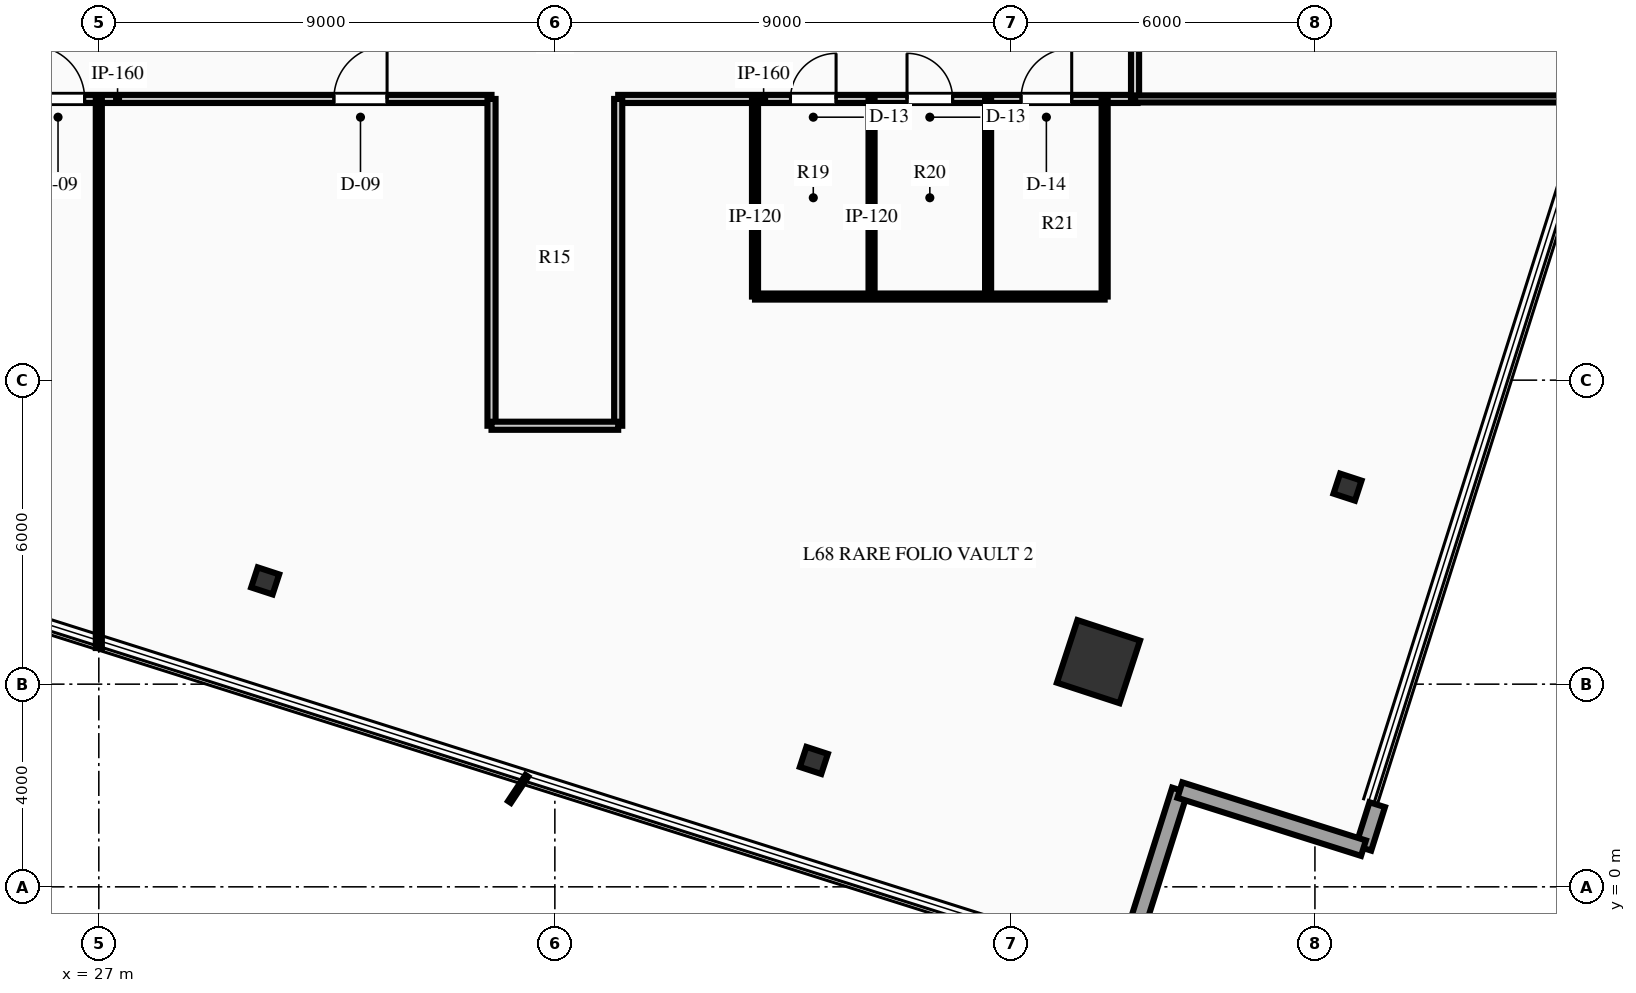
"""IFC4 building model, lengths in metres.
Left out: names, types, materials, properties, quantities, classifications, styles, units other than length and angle.
Written with IfcOpenShell. Run it as: python <this file> out.ifc"""

import sys

from ifc_helpers import new_model, si_unit, direction, frame, frame_2d, origin, origin_2d, place, context, subcontext, project, spatial, rectangle, hollow_rectangle, i_section, extrude, element, fill, save


model = new_model("IFC4")
c1 = context("Model", 3, precision=1e-05, world=origin(), true_north=direction((0.0, 1.0)))
c2 = subcontext(c1, "Body", "Model", "MODEL_VIEW")
j1 = project(units=[si_unit("LENGTHUNIT", "METRE"), si_unit("PLANEANGLEUNIT", "RADIAN")], contexts=[c1])
p1 = place(None, origin())
s1 = spatial("IfcSite", under=j1, at=p1, CompositionType="ELEMENT")
p2 = place(p1, origin())
s2 = spatial("IfcBuilding", under=s1, at=p2, CompositionType="ELEMENT")
p3 = place(p2, frame((0.0, 0.0, 271.2)))
s3 = spatial("IfcBuildingStorey", under=s2, at=p3, CompositionType="ELEMENT", Elevation=271.2)
p4 = place(p3, frame((46.728, 4.445, 0.0), z_axis=(0.0, 0.0, 1.0), x_axis=(0.311008203279, 0.950407227189, 0.0)))
e1 = element("IfcColumn", 1, at=p4, inside=s3, PredefinedType="COLUMN", context=c2, shape_type="SweptSolid", body=[
    extrude(hollow_rectangle(XDim=1.3, YDim=1.3, WallThickness=0.06, at=origin_2d()), origin(), (0.0, 0.0, 1.0), 3.75),
])
for number, where, z_axis, x_axis in (
    (2, (51.643, 7.889, 0.0), (0.0, 0.0, 1.0), (0.311, 0.95, 0.0)),
    (3, (30.283, 6.038, 0.0), (0.0, 0.0, 1.0), (0.311, 0.95, 0.0)),
    (4, (41.111, 2.495, 0.0), (0.0, 0.0, 1.0), (0.311, 0.95, 0.0)),
):
    element("IfcColumn", number, at=place(p3, frame(where, z_axis=z_axis, x_axis=x_axis)), inside=s3, PredefinedType="COLUMN", context=c2, shape_type="SweptSolid", body=[
        extrude(i_section(OverallWidth=0.416, OverallDepth=0.445, WebThickness=0.039, FlangeThickness=0.063, at=origin_2d()), origin(), (0.0, 0.0, 1.0), 3.75),
    ])
p5 = place(p3, frame((52.229, 1.622, 0.0), z_axis=(0.0, 0.0, 1.0), x_axis=(-0.301624624899, -0.95342675946, 0.0)))
e5 = element("IfcWall", 5, at=p5, inside=s3, PredefinedType="STANDARD", context=c2, shape_type="SweptSolid", body=[
    extrude(rectangle(XDim=0.9, YDim=0.32, at=frame_2d((0.45, 0.0))), origin(), (0.0, 0.0, 1.0), 3.48),
])
p6 = place(p3, frame((48.335, 1.909, 0.0), z_axis=(0.0, 0.0, 1.0), x_axis=(-0.301580261621, -0.953440793023, 0.0)))
e6 = element("IfcWall", 6, at=p6, inside=s3, PredefinedType="STANDARD", context=c2, shape_type="SweptSolid", body=[
    extrude(rectangle(XDim=3.8, YDim=0.32, at=frame_2d((1.9, 0.0))), origin(), (0.0, 0.0, 1.0), 3.48),
])
p7 = place(p3, frame((51.958, 0.763, 0.0), z_axis=(0.0, 0.0, 1.0), x_axis=(-0.953459265402, 0.301521855292, 0.0)))
e7 = element("IfcWall", 7, at=p7, inside=s3, PredefinedType="STANDARD", context=c2, shape_type="SweptSolid", body=[
    extrude(rectangle(XDim=3.8, YDim=0.32, at=frame_2d((1.9, 0.0))), origin(), (0.0, 0.0, 1.0), 3.48),
])
p8 = place(p3, frame((24.5, 15.55, 0.0), z_axis=(0.0, 0.0, 1.0), x_axis=(1.0, 0.0, 0.0)))
e8 = element("IfcWall", 8, at=p8, inside=s3, PredefinedType="PARTITIONING", context=c2, shape_type="SweptSolid", body=[
    extrude(rectangle(XDim=10.25, YDim=0.16, at=frame_2d((5.125, 0.0))), origin(), (0.0, 0.0, 1.0), 3.48),
])
p9 = place(p8, frame((1.17, 0.0, 0.0)))
e9 = element("IfcOpeningElement", 9, at=p9, cuts=e8, PredefinedType="OPENING", context=c2, shape_type="SweptSolid", body=[
    extrude(rectangle(XDim=1.05, YDim=2.15, at=frame_2d((0.525, 1.075))), frame((0.0, 0.09, 0.0), z_axis=(0.0, -1.0, 0.0), x_axis=(1.0, 0.0, 0.0)), (0.0, 0.0, 1.0), 0.18),
])
p10 = place(p8, frame((7.139, 0.0, 0.0)))
e10 = element("IfcOpeningElement", 10, at=p10, cuts=e8, PredefinedType="OPENING", context=c2, shape_type="SweptSolid", body=[
    extrude(rectangle(XDim=1.05, YDim=2.15, at=frame_2d((0.525, 1.075))), frame((0.0, 0.09, 0.0), z_axis=(0.0, -1.0, 0.0), x_axis=(1.0, 0.0, 0.0)), (0.0, 0.0, 1.0), 0.18),
])
p11 = place(p3, frame((37.25, 15.55, 0.0), z_axis=(0.0, 0.0, 1.0), x_axis=(1.0, 0.0, 0.0)))
e11 = element("IfcWall", 11, at=p11, inside=s3, PredefinedType="PARTITIONING", context=c2, shape_type="SweptSolid", body=[
    extrude(rectangle(XDim=10.25, YDim=0.16, at=frame_2d((5.125, 0.0))), origin(), (0.0, 0.0, 1.0), 3.48),
])
p12 = place(p11, frame((3.4, 0.0, 0.0)))
e12 = element("IfcOpeningElement", 12, at=p12, cuts=e11, PredefinedType="OPENING", context=c2, shape_type="SweptSolid", body=[
    extrude(rectangle(XDim=0.9, YDim=2.15, at=frame_2d((0.45, 1.075))), frame((0.0, 0.09, 0.0), z_axis=(0.0, -1.0, 0.0), x_axis=(1.0, 0.0, 0.0)), (0.0, 0.0, 1.0), 0.18),
])
p13 = place(p11, frame((5.7, 0.0, 0.0)))
e13 = element("IfcOpeningElement", 13, at=p13, cuts=e11, PredefinedType="OPENING", context=c2, shape_type="SweptSolid", body=[
    extrude(rectangle(XDim=0.9, YDim=2.15, at=frame_2d((0.45, 1.075))), frame((0.0, 0.09, 0.0), z_axis=(0.0, -1.0, 0.0), x_axis=(1.0, 0.0, 0.0)), (0.0, 0.0, 1.0), 0.18),
])
p14 = place(p11, frame((7.95, 0.0, 0.0)))
e14 = element("IfcOpeningElement", 14, at=p14, cuts=e11, PredefinedType="OPENING", context=c2, shape_type="SweptSolid", body=[
    extrude(rectangle(XDim=1.0, YDim=2.15, at=frame_2d((0.5, 1.075))), frame((0.0, 0.09, 0.0), z_axis=(0.0, -1.0, 0.0), x_axis=(1.0, 0.0, 0.0)), (0.0, 0.0, 1.0), 0.18),
])
p15 = place(p3, frame((47.45, 15.55, 0.0), z_axis=(0.0, 0.0, 1.0), x_axis=(0.0, 1.0, 0.0)))
e15 = element("IfcWall", 15, at=p15, inside=s3, PredefinedType="PARTITIONING", context=c2, shape_type="SweptSolid", body=[
    extrude(rectangle(XDim=9.2, YDim=0.16, at=frame_2d((4.6, 0.0))), origin(), (0.0, 0.0, 1.0), 3.48),
])
p16 = place(p15, frame((5.731, 0.0, 0.0)))
e16 = element("IfcOpeningElement", 16, at=p16, cuts=e15, PredefinedType="OPENING", context=c2, shape_type="SweptSolid", body=[
    extrude(rectangle(XDim=1.05, YDim=2.15, at=frame_2d((0.525, 1.075))), frame((0.0, 0.09, 0.0), z_axis=(0.0, -1.0, 0.0), x_axis=(1.0, 0.0, 0.0)), (0.0, 0.0, 1.0), 0.18),
])
for number, where, z_axis, x_axis in (
    (17, (34.75, 9.1, 0.0), (0.0, 0.0, 1.0), (0.0, 1.0, 0.0)),
    (18, (37.25, 9.1, 0.0), (0.0, 0.0, 1.0), (0.0, 1.0, 0.0)),
):
    element("IfcWall", number, at=place(p3, frame(where, z_axis=z_axis, x_axis=x_axis)), inside=s3, PredefinedType="PARTITIONING", context=c2, shape_type="SweptSolid", body=[
        extrude(rectangle(XDim=6.45, YDim=0.16, at=frame_2d((3.225, 0.0))), origin(), (0.0, 0.0, 1.0), 3.48),
    ])
p17 = place(p3, frame((34.75, 9.1, 0.0), z_axis=(0.0, 0.0, 1.0), x_axis=(1.0, 0.0, 0.0)))
e19 = element("IfcWall", 19, at=p17, inside=s3, PredefinedType="PARTITIONING", context=c2, shape_type="SweptSolid", body=[
    extrude(rectangle(XDim=2.5, YDim=0.16, at=frame_2d((1.25, 0.0))), origin(), (0.0, 0.0, 1.0), 3.48),
])
for number, where, z_axis, x_axis in (
    (20, (39.95, 11.65, 0.0), (0.0, 0.0, 1.0), (0.0, 1.0, 0.0)),
    (21, (42.25, 11.65, 0.0), (0.0, 0.0, 1.0), (0.0, 1.0, 0.0)),
    (22, (44.55, 11.65, 0.0), (0.0, 0.0, 1.0), (0.0, 1.0, 0.0)),
    (23, (46.85, 11.65, 0.0), (0.0, 0.0, 1.0), (0.0, 1.0, 0.0)),
):
    element("IfcWall", number, at=place(p3, frame(where, z_axis=z_axis, x_axis=x_axis)), inside=s3, PredefinedType="PARTITIONING", context=c2, shape_type="SweptSolid", body=[
        extrude(rectangle(XDim=3.9, YDim=0.12, at=frame_2d((1.95, 0.0))), origin(), (0.0, 0.0, 1.0), 3.48),
    ])
p18 = place(p3, frame((39.95, 11.65, 0.0), z_axis=(0.0, 0.0, 1.0), x_axis=(1.0, 0.0, 0.0)))
e24 = element("IfcWall", 24, at=p18, inside=s3, PredefinedType="PARTITIONING", context=c2, shape_type="SweptSolid", body=[
    extrude(rectangle(XDim=6.9, YDim=0.12, at=frame_2d((3.45, 0.0))), origin(), (0.0, 0.0, 1.0), 3.48),
])
p19 = place(p3, frame((47.45, 15.55, 0.0), z_axis=(0.0, 0.0, 1.0), x_axis=(1.0, 0.0, 0.0)))
e25 = element("IfcWall", 25, at=p19, inside=s3, PredefinedType="PARTITIONING", context=c2, shape_type="SweptSolid", body=[
    extrude(rectangle(XDim=9.142, YDim=0.14, at=frame_2d((4.571, 0.0))), origin(), (0.0, 0.0, 1.0), 3.48),
])
p20 = place(p3, frame((27.0, 4.713, 0.0), z_axis=(0.0, 0.0, 1.0), x_axis=(0.0, 1.0, 0.0)))
e26 = element("IfcWall", 26, at=p20, inside=s3, PredefinedType="PARTITIONING", context=c2, shape_type="SweptSolid", body=[
    extrude(rectangle(XDim=10.837, YDim=0.12, at=frame_2d((5.418, 0.0))), origin(), (0.0, 0.0, 1.0), 3.48),
])
p21 = place(p12, origin())
e27 = element("IfcDoor", 27, at=p21, inside=s3, OperationType="SINGLE_SWING_RIGHT", PredefinedType="DOOR", context=c2, shape_type="SweptSolid", body=[
    extrude(rectangle(XDim=0.9, YDim=2.15, at=frame_2d((0.45, 1.075))), frame((0.0, 0.025, 0.0), z_axis=(0.0, -1.0, 0.0), x_axis=(1.0, 0.0, 0.0)), (0.0, 0.0, 1.0), 0.05),
])
fill(e12, e27)
p22 = place(p13, origin())
e28 = element("IfcDoor", 28, at=p22, inside=s3, OperationType="SINGLE_SWING_LEFT", PredefinedType="DOOR", context=c2, shape_type="SweptSolid", body=[
    extrude(rectangle(XDim=0.9, YDim=2.15, at=frame_2d((0.45, 1.075))), frame((0.0, 0.025, 0.0), z_axis=(0.0, -1.0, 0.0), x_axis=(1.0, 0.0, 0.0)), (0.0, 0.0, 1.0), 0.05),
])
fill(e13, e28)
p23 = place(p14, origin())
e29 = element("IfcDoor", 29, at=p23, inside=s3, OperationType="SINGLE_SWING_RIGHT", PredefinedType="DOOR", context=c2, shape_type="SweptSolid", body=[
    extrude(rectangle(XDim=1.0, YDim=2.15, at=frame_2d((0.5, 1.075))), frame((0.0, 0.025, 0.0), z_axis=(0.0, -1.0, 0.0), x_axis=(1.0, 0.0, 0.0)), (0.0, 0.0, 1.0), 0.05),
])
fill(e14, e29)
p24 = place(p9, origin())
e30 = element("IfcDoor", 30, at=p24, inside=s3, OperationType="SINGLE_SWING_LEFT", PredefinedType="DOOR", context=c2, shape_type="SweptSolid", body=[
    extrude(rectangle(XDim=1.05, YDim=2.15, at=frame_2d((0.525, 1.075))), frame((0.0, 0.025, 0.0), z_axis=(0.0, -1.0, 0.0), x_axis=(1.0, 0.0, 0.0)), (0.0, 0.0, 1.0), 0.05),
])
fill(e9, e30)
p25 = place(p10, origin())
e31 = element("IfcDoor", 31, at=p25, inside=s3, OperationType="SINGLE_SWING_RIGHT", PredefinedType="DOOR", context=c2, shape_type="SweptSolid", body=[
    extrude(rectangle(XDim=1.05, YDim=2.15, at=frame_2d((0.525, 1.075))), frame((0.0, 0.025, 0.0), z_axis=(0.0, -1.0, 0.0), x_axis=(1.0, 0.0, 0.0)), (0.0, 0.0, 1.0), 0.05),
])
fill(e10, e31)
save(model, sys.argv[1])
